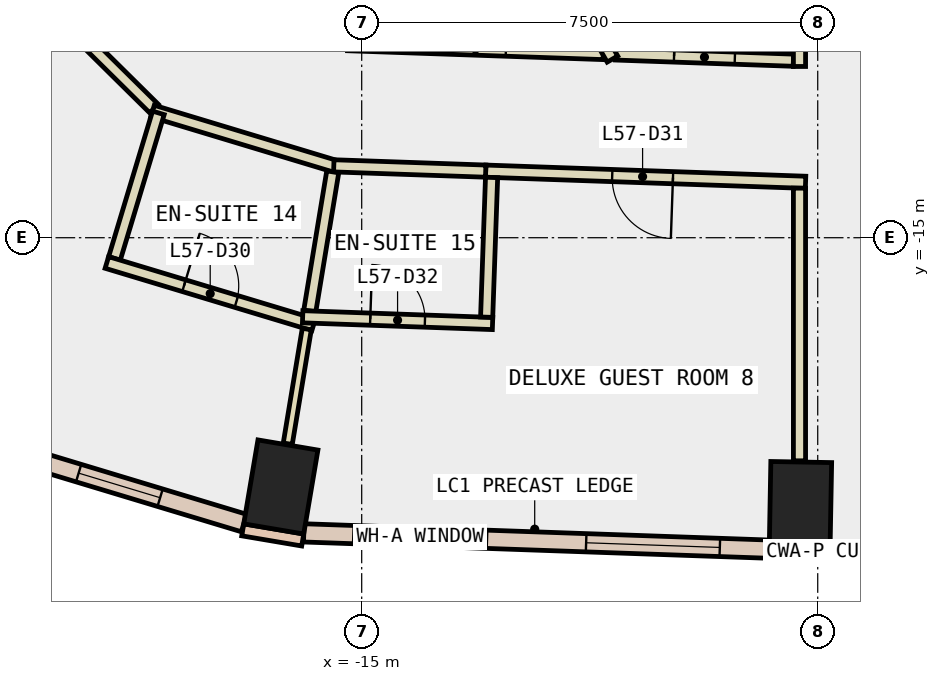
"""IFC4 building model, lengths in metres.
Left out: names, types, materials, properties, quantities, classifications, styles, units other than length and angle.
Written with IfcOpenShell. Run it as: python <this file> out.ifc"""

import sys

from ifc_helpers import new_model, si_unit, direction, frame, frame_2d, origin, origin_2d, place, context, subcontext, project, spatial, rectangle, extrude, element, fill, save


model = new_model("IFC4")
c1 = context("Model", 3, precision=1e-05, world=origin(), true_north=direction((0.0, 1.0)))
c2 = subcontext(c1, "Body", "Model", "MODEL_VIEW")
j1 = project(units=[si_unit("LENGTHUNIT", "METRE"), si_unit("PLANEANGLEUNIT", "RADIAN")], contexts=[c1])
p1 = place(None, origin())
s1 = spatial("IfcSite", under=j1, at=p1, CompositionType="ELEMENT")
p2 = place(p1, origin())
s2 = spatial("IfcBuilding", under=s1, at=p2, CompositionType="ELEMENT")
p3 = place(p2, frame((0.0, 0.0, 252.2)))
s3 = spatial("IfcBuildingStorey", under=s2, at=p3, CompositionType="ELEMENT", Elevation=252.2)
for number, where, z_axis, x_axis in (
    (1, (-16.33, -19.099, -0.34), (0.0, 0.0, 1.0), (-0.986, 0.167, 0.0)),
    (2, (-7.784, -19.389, -0.34), (0.0, 0.0, 1.0), (-1.0, 0.018, 0.0)),
):
    element("IfcColumn", number, at=place(p3, frame(where, z_axis=z_axis, x_axis=x_axis)), inside=s3, PredefinedType="COLUMN", context=c2, shape_type="SweptSolid", body=[
        extrude(rectangle(XDim=1.0, YDim=1.4, at=origin_2d()), origin(), (0.0, 0.0, 1.0), 3.6),
    ])
for number, where, z_axis, x_axis in (
    (3, (-16.956, -19.804, 0.0), (0.0, 0.0, 1.0), (0.986, -0.167, 0.0)),
    (4, (-8.298, -20.18, 0.0), (0.0, 0.0, 1.0), (1.0, -0.018, 0.0)),
):
    element("IfcWall", number, at=place(p3, frame(where, z_axis=z_axis, x_axis=x_axis)), inside=s3, PredefinedType="STANDARD", context=c2, shape_type="SweptSolid", body=[
        extrude(rectangle(XDim=1.0, YDim=0.2, at=frame_2d((0.5, 0.0))), origin(), (0.0, 0.0, 1.0), 3.26),
    ])
p4 = place(p3, frame((-15.952, -19.854, 0.0), z_axis=(0.0, 0.0, 1.0), x_axis=(0.999387577449, -0.034992428331, 0.0)))
e5 = element("IfcWall", 5, at=p4, inside=s3, PredefinedType="STANDARD", context=c2, shape_type="SweptSolid", body=[
    extrude(rectangle(XDim=7.661, YDim=0.3, at=frame_2d((3.83, 0.0))), origin(), (0.0, 0.0, 1.0), 3.26),
])
p5 = place(p4, frame((0.815, 0.0, 0.9)))
e6 = element("IfcOpeningElement", 6, at=p5, cuts=e5, PredefinedType="OPENING", context=c2, shape_type="SweptSolid", body=[
    extrude(rectangle(XDim=2.2, YDim=2.0, at=frame_2d((1.1, 1.0))), frame((0.0, 0.16, 0.0), z_axis=(0.0, -1.0, 0.0), x_axis=(1.0, 0.0, 0.0)), (0.0, 0.0, 1.0), 0.32),
])
p6 = place(p4, frame((4.646, 0.0, 0.9)))
e7 = element("IfcOpeningElement", 7, at=p6, cuts=e5, PredefinedType="OPENING", context=c2, shape_type="SweptSolid", body=[
    extrude(rectangle(XDim=2.2, YDim=2.0, at=frame_2d((1.1, 1.0))), frame((0.0, 0.16, 0.0), z_axis=(0.0, -1.0, 0.0), x_axis=(1.0, 0.0, 0.0)), (0.0, 0.0, 1.0), 0.32),
])
p7 = place(p3, frame((-21.034, -18.455, 0.0), z_axis=(0.0, 0.0, 1.0), x_axis=(0.957346168713, -0.288943442997, 0.0)))
e8 = element("IfcWall", 8, at=p7, inside=s3, PredefinedType="STANDARD", context=c2, shape_type="SweptSolid", body=[
    extrude(rectangle(XDim=4.281, YDim=0.3, at=frame_2d((2.14, 0.0))), origin(), (0.0, 0.0, 1.0), 3.26),
])
p8 = place(p7, frame((1.44, 0.0, 0.9)))
e9 = element("IfcOpeningElement", 9, at=p8, cuts=e8, PredefinedType="OPENING", context=c2, shape_type="SweptSolid", body=[
    extrude(rectangle(XDim=1.4, YDim=2.0, at=frame_2d((0.7, 1.0))), frame((0.0, 0.16, 0.0), z_axis=(0.0, -1.0, 0.0), x_axis=(1.0, 0.0, 0.0)), (0.0, 0.0, 1.0), 0.32),
])
p9 = place(p3, frame((-10.826, -11.978, 0.0), z_axis=(0.0, 0.0, 1.0), x_axis=(0.999380679818, -0.035188873332, 0.0)))
e10 = element("IfcWall", 10, at=p9, inside=s3, PredefinedType="PARTITIONING", context=c2, shape_type="SweptSolid", body=[
    extrude(rectangle(XDim=2.928, YDim=0.2, at=frame_2d((1.464, 0.0))), origin(), (0.0, 0.0, 1.0), 3.26),
])
p10 = place(p9, frame((0.964, 0.0, 0.0)))
e11 = element("IfcOpeningElement", 11, at=p10, cuts=e10, PredefinedType="OPENING", context=c2, shape_type="SweptSolid", body=[
    extrude(rectangle(XDim=1.0, YDim=2.1, at=frame_2d((0.5, 1.05))), frame((0.0, 0.11, 0.0), z_axis=(0.0, -1.0, 0.0), x_axis=(1.0, 0.0, 0.0)), (0.0, 0.0, 1.0), 0.22),
])
p11 = place(p3, frame((-15.23, -11.825, 0.0), z_axis=(0.0, 0.0, 1.0), x_axis=(0.999397560436, -0.0347061406, 0.0)))
e12 = element("IfcWall", 12, at=p11, inside=s3, PredefinedType="PARTITIONING", context=c2, shape_type="SweptSolid", body=[
    extrude(rectangle(XDim=4.207, YDim=0.2, at=frame_2d((2.103, 0.0))), origin(), (0.0, 0.0, 1.0), 3.26),
])
p12 = place(p11, frame((1.603, 0.0, 0.0)))
e13 = element("IfcOpeningElement", 13, at=p12, cuts=e12, PredefinedType="OPENING", context=c2, shape_type="SweptSolid", body=[
    extrude(rectangle(XDim=1.0, YDim=2.1, at=frame_2d((0.5, 1.05))), frame((0.0, 0.11, 0.0), z_axis=(0.0, -1.0, 0.0), x_axis=(1.0, 0.0, 0.0)), (0.0, 0.0, 1.0), 0.22),
])
p13 = place(p3, frame((-18.415, -12.877, 0.0), z_axis=(0.0, 0.0, 1.0), x_axis=(-0.711078065077, 0.70311306727, 0.0)))
e14 = element("IfcWall", 14, at=p13, inside=s3, PredefinedType="PARTITIONING", context=c2, shape_type="SweptSolid", body=[
    extrude(rectangle(XDim=2.115, YDim=0.2, at=frame_2d((1.058, 0.0))), origin(), (0.0, 0.0, 1.0), 3.26),
])
p14 = place(p3, frame((-15.363, -13.847, 0.0), z_axis=(0.0, 0.0, 1.0), x_axis=(-0.957320969561, 0.289026921303, 0.0)))
e15 = element("IfcWall", 15, at=p14, inside=s3, PredefinedType="PARTITIONING", context=c2, shape_type="SweptSolid", body=[
    extrude(rectangle(XDim=3.214, YDim=0.2, at=frame_2d((1.607, 0.0))), origin(), (0.0, 0.0, 1.0), 3.26),
])
p15 = place(p3, frame((-7.7, -14.089, 0.0), z_axis=(0.0, 0.0, 1.0), x_axis=(-0.999388410674, 0.034968623214, 0.0)))
e16 = element("IfcWall", 16, at=p15, inside=s3, PredefinedType="PARTITIONING", context=c2, shape_type="SweptSolid", body=[
    extrude(rectangle(XDim=5.264, YDim=0.2, at=frame_2d((2.632, 0.0))), origin(), (0.0, 0.0, 1.0), 3.26),
])
p16 = place(p15, frame((2.182, 0.0, 0.0)))
e17 = element("IfcOpeningElement", 17, at=p16, cuts=e16, PredefinedType="OPENING", context=c2, shape_type="SweptSolid", body=[
    extrude(rectangle(XDim=1.0, YDim=2.1, at=frame_2d((0.5, 1.05))), frame((0.0, 0.11, 0.0), z_axis=(0.0, -1.0, 0.0), x_axis=(1.0, 0.0, 0.0)), (0.0, 0.0, 1.0), 0.22),
])
p17 = place(p3, frame((-12.961, -13.905, 0.0), z_axis=(0.0, 0.0, 1.0), x_axis=(-0.999395279268, 0.034771766949, 0.0)))
e18 = element("IfcWall", 18, at=p17, inside=s3, PredefinedType="PARTITIONING", context=c2, shape_type="SweptSolid", body=[
    extrude(rectangle(XDim=2.5, YDim=0.2, at=frame_2d((1.25, 0.0))), origin(), (0.0, 0.0, 1.0), 3.26),
])
p18 = place(p3, frame((-7.8, -12.184, 0.0), z_axis=(0.0, 0.0, 1.0), x_axis=(0.0, 1.0, 0.0)))
e19 = element("IfcWall", 19, at=p18, inside=s3, PredefinedType="PARTITIONING", context=c2, shape_type="SweptSolid", body=[
    extrude(rectangle(XDim=4.685, YDim=0.2, at=frame_2d((2.343, 0.0))), origin(), (0.0, 0.0, 1.0), 3.26),
])
p19 = place(p3, frame((-7.8, -18.669, 0.0), z_axis=(0.0, 0.0, 1.0), x_axis=(0.0, 1.0, 0.0)))
e20 = element("IfcWall", 20, at=p19, inside=s3, PredefinedType="PARTITIONING", context=c2, shape_type="SweptSolid", body=[
    extrude(rectangle(XDim=4.484, YDim=0.2, at=frame_2d((2.242, 0.0))), origin(), (0.0, 0.0, 1.0), 3.26),
])
p20 = place(p3, frame((-10.876, -12.062, 0.0), z_axis=(0.0, 0.0, 1.0), x_axis=(-0.499977877545, 0.866038175813, 0.0)))
e21 = element("IfcWall", 21, at=p20, inside=s3, PredefinedType="PARTITIONING", context=c2, shape_type="SweptSolid", body=[
    extrude(rectangle(XDim=4.302, YDim=0.2, at=frame_2d((2.151, 0.0))), origin(), (0.0, 0.0, 1.0), 3.26),
])
p21 = place(p3, frame((-18.344, -12.947, 0.0), z_axis=(0.0, 0.0, 1.0), x_axis=(-0.288709122303, -0.957416859419, 0.0)))
e22 = element("IfcWall", 22, at=p21, inside=s3, PredefinedType="PARTITIONING", context=c2, shape_type="SweptSolid", body=[
    extrude(rectangle(XDim=2.5, YDim=0.2, at=frame_2d((1.25, 0.0))), origin(), (0.0, 0.0, 1.0), 3.26),
])
p22 = place(p3, frame((-19.191, -15.407, 0.0), z_axis=(0.0, 0.0, 1.0), x_axis=(0.957443200759, -0.28862175476, 0.0)))
e23 = element("IfcWall", 23, at=p22, inside=s3, PredefinedType="PARTITIONING", context=c2, shape_type="SweptSolid", body=[
    extrude(rectangle(XDim=3.551, YDim=0.2, at=frame_2d((1.775, 0.0))), origin(), (0.0, 0.0, 1.0), 3.26),
])
p23 = place(p22, frame((1.325, 0.0, 0.0)))
e24 = element("IfcOpeningElement", 24, at=p23, cuts=e23, PredefinedType="OPENING", context=c2, shape_type="SweptSolid", body=[
    extrude(rectangle(XDim=0.9, YDim=2.1, at=frame_2d((0.45, 1.05))), frame((0.0, 0.11, 0.0), z_axis=(0.0, -1.0, 0.0), x_axis=(1.0, 0.0, 0.0)), (0.0, 0.0, 1.0), 0.22),
])
p24 = place(p3, frame((-15.903, -16.502, 0.0), z_axis=(0.0, 0.0, 1.0), x_axis=(-0.163715562906, -0.986507584594, 0.0)))
e25 = element("IfcWall", 25, at=p24, inside=s3, PredefinedType="PARTITIONING", context=c2, shape_type="SweptSolid", body=[
    extrude(rectangle(XDim=1.912, YDim=0.15, at=frame_2d((0.956, 0.0))), origin(), (0.0, 0.0, 1.0), 3.26),
])
p25 = place(p3, frame((-15.476, -13.917, 0.0), z_axis=(0.0, 0.0, 1.0), x_axis=(-0.162964805234, -0.986631882849, 0.0)))
e26 = element("IfcWall", 26, at=p25, inside=s3, PredefinedType="PARTITIONING", context=c2, shape_type="SweptSolid", body=[
    extrude(rectangle(XDim=2.319, YDim=0.2, at=frame_2d((1.16, 0.0))), origin(), (0.0, 0.0, 1.0), 3.26),
])
p26 = place(p3, frame((-15.971, -16.3, 0.0), z_axis=(0.0, 0.0, 1.0), x_axis=(0.999370791233, -0.035468600627, 0.0)))
e27 = element("IfcWall", 27, at=p26, inside=s3, PredefinedType="PARTITIONING", context=c2, shape_type="SweptSolid", body=[
    extrude(rectangle(XDim=3.125, YDim=0.2, at=frame_2d((1.562, 0.0))), origin(), (0.0, 0.0, 1.0), 3.26),
])
p27 = place(p26, frame((1.112, 0.0, 0.0)))
e28 = element("IfcOpeningElement", 28, at=p27, cuts=e27, PredefinedType="OPENING", context=c2, shape_type="SweptSolid", body=[
    extrude(rectangle(XDim=0.9, YDim=2.1, at=frame_2d((0.45, 1.05))), frame((0.0, 0.11, 0.0), z_axis=(0.0, -1.0, 0.0), x_axis=(1.0, 0.0, 0.0)), (0.0, 0.0, 1.0), 0.22),
])
p28 = place(p3, frame((-12.945, -16.307, 0.0), z_axis=(0.0, 0.0, 1.0), x_axis=(0.035252193458, 0.999378448265, 0.0)))
e29 = element("IfcWall", 29, at=p28, inside=s3, PredefinedType="PARTITIONING", context=c2, shape_type="SweptSolid", body=[
    extrude(rectangle(XDim=2.299, YDim=0.2, at=frame_2d((1.15, 0.0))), origin(), (0.0, 0.0, 1.0), 3.26),
])
p29 = place(p5, origin())
e30 = element("IfcWindow", 30, at=p29, inside=s3, PartitioningType="SINGLE_PANEL", PredefinedType="WINDOW", context=c2, shape_type="SweptSolid", body=[
    extrude(rectangle(XDim=2.2, YDim=2.0, at=frame_2d((1.1, 1.0))), frame((0.0, 0.03, 0.0), z_axis=(0.0, -1.0, 0.0), x_axis=(1.0, 0.0, 0.0)), (0.0, 0.0, 1.0), 0.06),
])
fill(e6, e30)
p30 = place(p6, origin())
e31 = element("IfcWindow", 31, at=p30, inside=s3, PartitioningType="SINGLE_PANEL", PredefinedType="WINDOW", context=c2, shape_type="SweptSolid", body=[
    extrude(rectangle(XDim=2.2, YDim=2.0, at=frame_2d((1.1, 1.0))), frame((0.0, 0.03, 0.0), z_axis=(0.0, -1.0, 0.0), x_axis=(1.0, 0.0, 0.0)), (0.0, 0.0, 1.0), 0.06),
])
fill(e7, e31)
p31 = place(p8, origin())
e32 = element("IfcWindow", 32, at=p31, inside=s3, PartitioningType="SINGLE_PANEL", PredefinedType="WINDOW", context=c2, shape_type="SweptSolid", body=[
    extrude(rectangle(XDim=1.4, YDim=2.0, at=frame_2d((0.7, 1.0))), frame((0.0, 0.03, 0.0), z_axis=(0.0, -1.0, 0.0), x_axis=(1.0, 0.0, 0.0)), (0.0, 0.0, 1.0), 0.06),
])
fill(e9, e32)
p32 = place(p23, origin())
e33 = element("IfcDoor", 33, at=p32, inside=s3, OperationType="SINGLE_SWING_LEFT", PredefinedType="DOOR", context=c2, shape_type="SweptSolid", body=[
    extrude(rectangle(XDim=0.9, YDim=2.1, at=frame_2d((0.45, 1.05))), frame((0.0, 0.025, 0.0), z_axis=(0.0, -1.0, 0.0), x_axis=(1.0, 0.0, 0.0)), (0.0, 0.0, 1.0), 0.05),
])
fill(e24, e33)
p33 = place(p16, origin())
e34 = element("IfcDoor", 34, at=p33, inside=s3, OperationType="SINGLE_SWING_LEFT", PredefinedType="DOOR", context=c2, shape_type="SweptSolid", body=[
    extrude(rectangle(XDim=1.0, YDim=2.1, at=frame_2d((0.5, 1.05))), frame((0.0, 0.025, 0.0), z_axis=(0.0, -1.0, 0.0), x_axis=(1.0, 0.0, 0.0)), (0.0, 0.0, 1.0), 0.05),
])
fill(e17, e34)
p34 = place(p27, origin())
e35 = element("IfcDoor", 35, at=p34, inside=s3, OperationType="SINGLE_SWING_LEFT", PredefinedType="DOOR", context=c2, shape_type="SweptSolid", body=[
    extrude(rectangle(XDim=0.9, YDim=2.1, at=frame_2d((0.45, 1.05))), frame((0.0, 0.025, 0.0), z_axis=(0.0, -1.0, 0.0), x_axis=(1.0, 0.0, 0.0)), (0.0, 0.0, 1.0), 0.05),
])
fill(e28, e35)
p35 = place(p10, origin())
e36 = element("IfcDoor", 36, at=p35, inside=s3, OperationType="SINGLE_SWING_LEFT", PredefinedType="DOOR", context=c2, shape_type="SweptSolid", body=[
    extrude(rectangle(XDim=1.0, YDim=2.1, at=frame_2d((0.5, 1.05))), frame((0.0, 0.025, 0.0), z_axis=(0.0, -1.0, 0.0), x_axis=(1.0, 0.0, 0.0)), (0.0, 0.0, 1.0), 0.05),
])
fill(e11, e36)
save(model, sys.argv[1])
